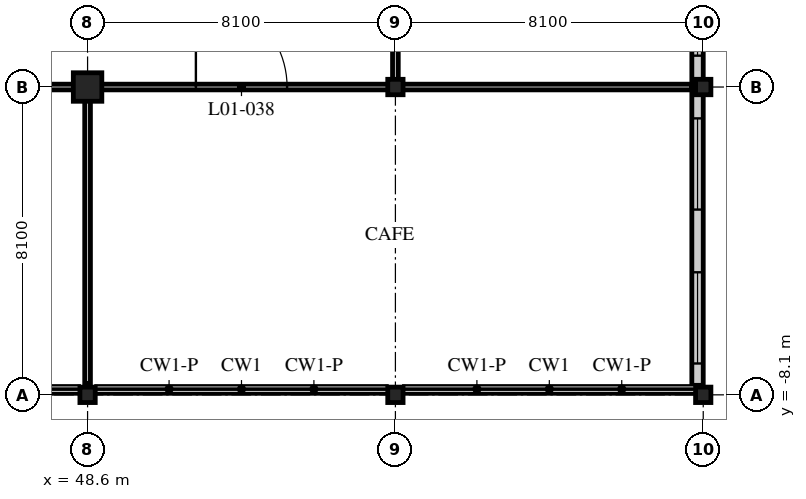
"""IFC4 building model, lengths in metres.
Left out: names, types, materials, properties, quantities, classifications, styles, units other than length and angle.
Written with IfcOpenShell. Run it as: python <this file> out.ifc"""

import sys

from ifc_helpers import new_model, si_unit, direction, frame, frame_2d, origin, origin_with_axes, origin_2d, place, context, subcontext, project, spatial, rectangle, hollow_rectangle, i_section, extrude, element, fill, save


model = new_model("IFC4")
c1 = context("Model", 3, precision=1e-05, world=origin(), true_north=direction((0.0, 1.0)))
c2 = subcontext(c1, "Body", "Model", "MODEL_VIEW")
j1 = project(units=[si_unit("LENGTHUNIT", "METRE"), si_unit("PLANEANGLEUNIT", "RADIAN")], contexts=[c1])
p1 = place(None, origin())
s1 = spatial("IfcSite", under=j1, at=p1, CompositionType="ELEMENT")
p2 = place(p1, origin())
s2 = spatial("IfcBuilding", under=s1, at=p2, CompositionType="ELEMENT")
p3 = place(p2, frame((0.0, 0.0, 6.0)))
s3 = spatial("IfcBuildingStorey", under=s2, at=p3, CompositionType="ELEMENT", Elevation=6.0)
p4 = place(p3, frame((48.6, -8.1, 0.0), z_axis=(0.0, 0.0, 1.0), x_axis=(1.0, 0.0, 0.0)))
e1 = element("IfcColumn", 1, at=p4, inside=s3, PredefinedType="COLUMN", context=c2, shape_type="SweptSolid", body=[
    extrude(i_section(OverallWidth=0.403, OverallDepth=0.406, WebThickness=0.027, FlangeThickness=0.043, FilletRadius=0.015, at=origin_2d()), origin(), (0.0, 0.0, 1.0), 5.4),
])
p5 = place(p3, frame((48.6, 0.0, 0.0), z_axis=(0.0, 0.0, 1.0), x_axis=(1.0, 0.0, 0.0)))
e2 = element("IfcColumn", 2, at=p5, inside=s3, PredefinedType="COLUMN", context=c2, shape_type="SweptSolid", body=[
    extrude(hollow_rectangle(XDim=0.75, YDim=0.75, WallThickness=0.07, at=origin_2d()), origin(), (0.0, 0.0, 1.0), 5.4),
])
for number, where, z_axis, x_axis in (
    (3, (56.7, -8.1, 0.0), (0.0, 0.0, 1.0), (1.0, 0.0, 0.0)),
    (4, (56.7, 0.0, 0.0), (0.0, 0.0, 1.0), (1.0, 0.0, 0.0)),
    (5, (64.8, -8.1, 0.0), (0.0, 0.0, 1.0), (1.0, 0.0, 0.0)),
    (6, (64.8, 0.0, 0.0), (0.0, 0.0, 1.0), (1.0, 0.0, 0.0)),
):
    element("IfcColumn", number, at=place(p3, frame(where, z_axis=z_axis, x_axis=x_axis)), inside=s3, PredefinedType="COLUMN", context=c2, shape_type="SweptSolid", body=[
        extrude(i_section(OverallWidth=0.403, OverallDepth=0.406, WebThickness=0.027, FlangeThickness=0.043, FilletRadius=0.015, at=origin_2d()), origin(), (0.0, 0.0, 1.0), 5.4),
    ])
p6 = place(p3, frame((64.65, -7.85, 0.0), z_axis=(0.0, 0.0, 1.0), x_axis=(0.0, 1.0, 0.0)))
e7 = element("IfcWall", 7, at=p6, inside=s3, PredefinedType="SOLIDWALL", context=c2, shape_type="SweptSolid", body=[
    extrude(rectangle(XDim=56.45, YDim=0.3, at=frame_2d((28.225, 0.0))), origin(), (0.0, 0.0, 1.0), 5.15),
])
p7 = place(p6, frame((0.575, 0.0, 1.0)))
e8 = element("IfcOpeningElement", 8, at=p7, cuts=e7, PredefinedType="OPENING", context=c2, shape_type="SweptSolid", body=[
    extrude(rectangle(XDim=2.4, YDim=2.75, at=frame_2d((1.2, 1.375))), frame((0.0, 0.16, 0.0), z_axis=(0.0, -1.0, 0.0), x_axis=(1.0, 0.0, 0.0)), (0.0, 0.0, 1.0), 0.32),
])
p8 = place(p6, frame((4.625, 0.0, 1.0)))
e9 = element("IfcOpeningElement", 9, at=p8, cuts=e7, PredefinedType="OPENING", context=c2, shape_type="SweptSolid", body=[
    extrude(rectangle(XDim=2.4, YDim=2.75, at=frame_2d((1.2, 1.375))), frame((0.0, 0.16, 0.0), z_axis=(0.0, -1.0, 0.0), x_axis=(1.0, 0.0, 0.0)), (0.0, 0.0, 1.0), 0.32),
])
p9 = place(p6, frame((8.675, 0.0, 1.0)))
e10 = element("IfcOpeningElement", 10, at=p9, cuts=e7, PredefinedType="OPENING", context=c2, shape_type="SweptSolid", body=[
    extrude(rectangle(XDim=2.4, YDim=2.75, at=frame_2d((1.2, 1.375))), frame((0.0, 0.16, 0.0), z_axis=(0.0, -1.0, 0.0), x_axis=(1.0, 0.0, 0.0)), (0.0, 0.0, 1.0), 0.32),
])
p10 = place(p6, frame((12.725, 0.0, 1.0)))
e11 = element("IfcOpeningElement", 11, at=p10, cuts=e7, PredefinedType="OPENING", context=c2, shape_type="SweptSolid", body=[
    extrude(rectangle(XDim=2.4, YDim=2.75, at=frame_2d((1.2, 1.375))), frame((0.0, 0.16, 0.0), z_axis=(0.0, -1.0, 0.0), x_axis=(1.0, 0.0, 0.0)), (0.0, 0.0, 1.0), 0.32),
])
p11 = place(p6, frame((16.775, 0.0, 1.0)))
e12 = element("IfcOpeningElement", 12, at=p11, cuts=e7, PredefinedType="OPENING", context=c2, shape_type="SweptSolid", body=[
    extrude(rectangle(XDim=2.4, YDim=2.75, at=frame_2d((1.2, 1.375))), frame((0.0, 0.16, 0.0), z_axis=(0.0, -1.0, 0.0), x_axis=(1.0, 0.0, 0.0)), (0.0, 0.0, 1.0), 0.32),
])
p12 = place(p6, frame((20.825, 0.0, 1.0)))
e13 = element("IfcOpeningElement", 13, at=p12, cuts=e7, PredefinedType="OPENING", context=c2, shape_type="SweptSolid", body=[
    extrude(rectangle(XDim=2.4, YDim=2.75, at=frame_2d((1.2, 1.375))), frame((0.0, 0.16, 0.0), z_axis=(0.0, -1.0, 0.0), x_axis=(1.0, 0.0, 0.0)), (0.0, 0.0, 1.0), 0.32),
])
p13 = place(p6, frame((24.875, 0.0, 1.0)))
e14 = element("IfcOpeningElement", 14, at=p13, cuts=e7, PredefinedType="OPENING", context=c2, shape_type="SweptSolid", body=[
    extrude(rectangle(XDim=2.4, YDim=2.75, at=frame_2d((1.2, 1.375))), frame((0.0, 0.16, 0.0), z_axis=(0.0, -1.0, 0.0), x_axis=(1.0, 0.0, 0.0)), (0.0, 0.0, 1.0), 0.32),
])
p14 = place(p6, frame((28.925, 0.0, 1.0)))
e15 = element("IfcOpeningElement", 15, at=p14, cuts=e7, PredefinedType="OPENING", context=c2, shape_type="SweptSolid", body=[
    extrude(rectangle(XDim=2.4, YDim=2.75, at=frame_2d((1.2, 1.375))), frame((0.0, 0.16, 0.0), z_axis=(0.0, -1.0, 0.0), x_axis=(1.0, 0.0, 0.0)), (0.0, 0.0, 1.0), 0.32),
])
p15 = place(p6, frame((32.975, 0.0, 1.0)))
e16 = element("IfcOpeningElement", 16, at=p15, cuts=e7, PredefinedType="OPENING", context=c2, shape_type="SweptSolid", body=[
    extrude(rectangle(XDim=2.4, YDim=2.75, at=frame_2d((1.2, 1.375))), frame((0.0, 0.16, 0.0), z_axis=(0.0, -1.0, 0.0), x_axis=(1.0, 0.0, 0.0)), (0.0, 0.0, 1.0), 0.32),
])
p16 = place(p6, frame((37.025, 0.0, 1.0)))
e17 = element("IfcOpeningElement", 17, at=p16, cuts=e7, PredefinedType="OPENING", context=c2, shape_type="SweptSolid", body=[
    extrude(rectangle(XDim=2.4, YDim=2.75, at=frame_2d((1.2, 1.375))), frame((0.0, 0.16, 0.0), z_axis=(0.0, -1.0, 0.0), x_axis=(1.0, 0.0, 0.0)), (0.0, 0.0, 1.0), 0.32),
])
p17 = place(p6, frame((41.075, 0.0, 1.0)))
e18 = element("IfcOpeningElement", 18, at=p17, cuts=e7, PredefinedType="OPENING", context=c2, shape_type="SweptSolid", body=[
    extrude(rectangle(XDim=2.4, YDim=2.75, at=frame_2d((1.2, 1.375))), frame((0.0, 0.16, 0.0), z_axis=(0.0, -1.0, 0.0), x_axis=(1.0, 0.0, 0.0)), (0.0, 0.0, 1.0), 0.32),
])
p18 = place(p6, frame((45.125, 0.0, 1.0)))
e19 = element("IfcOpeningElement", 19, at=p18, cuts=e7, PredefinedType="OPENING", context=c2, shape_type="SweptSolid", body=[
    extrude(rectangle(XDim=2.4, YDim=2.75, at=frame_2d((1.2, 1.375))), frame((0.0, 0.16, 0.0), z_axis=(0.0, -1.0, 0.0), x_axis=(1.0, 0.0, 0.0)), (0.0, 0.0, 1.0), 0.32),
])
p19 = place(p6, frame((49.175, 0.0, 1.0)))
e20 = element("IfcOpeningElement", 20, at=p19, cuts=e7, PredefinedType="OPENING", context=c2, shape_type="SweptSolid", body=[
    extrude(rectangle(XDim=2.4, YDim=2.75, at=frame_2d((1.2, 1.375))), frame((0.0, 0.16, 0.0), z_axis=(0.0, -1.0, 0.0), x_axis=(1.0, 0.0, 0.0)), (0.0, 0.0, 1.0), 0.32),
])
p20 = place(p6, frame((53.225, 0.0, 1.0)))
e21 = element("IfcOpeningElement", 21, at=p20, cuts=e7, PredefinedType="OPENING", context=c2, shape_type="SweptSolid", body=[
    extrude(rectangle(XDim=2.4, YDim=2.75, at=frame_2d((1.2, 1.375))), frame((0.0, 0.16, 0.0), z_axis=(0.0, -1.0, 0.0), x_axis=(1.0, 0.0, 0.0)), (0.0, 0.0, 1.0), 0.32),
])
p21 = place(p3, origin_with_axes())
e22 = element("IfcWall", 22, at=p21, inside=s3, PredefinedType="PARTITIONING", context=c2, shape_type="SweptSolid", body=[
    extrude(rectangle(XDim=56.7, YDim=0.15, at=frame_2d((28.35, 0.0))), origin(), (0.0, 0.0, 1.0), 4.538),
])
p22 = place(p21, frame((10.95, 0.0, 0.0)))
e23 = element("IfcOpeningElement", 23, at=p22, cuts=e22, PredefinedType="OPENING", context=c2, shape_type="SweptSolid", body=[
    extrude(rectangle(XDim=2.4, YDim=2.7, at=frame_2d((1.2, 1.35))), frame((0.0, 0.085, 0.0), z_axis=(0.0, -1.0, 0.0), x_axis=(1.0, 0.0, 0.0)), (0.0, 0.0, 1.0), 0.17),
])
p23 = place(p21, frame((19.05, 0.0, 0.0)))
e24 = element("IfcOpeningElement", 24, at=p23, cuts=e22, PredefinedType="OPENING", context=c2, shape_type="SweptSolid", body=[
    extrude(rectangle(XDim=2.4, YDim=2.7, at=frame_2d((1.2, 1.35))), frame((0.0, 0.085, 0.0), z_axis=(0.0, -1.0, 0.0), x_axis=(1.0, 0.0, 0.0)), (0.0, 0.0, 1.0), 0.17),
])
p24 = place(p21, frame((27.15, 0.0, 0.0)))
e25 = element("IfcOpeningElement", 25, at=p24, cuts=e22, PredefinedType="OPENING", context=c2, shape_type="SweptSolid", body=[
    extrude(rectangle(XDim=2.4, YDim=2.7, at=frame_2d((1.2, 1.35))), frame((0.0, 0.085, 0.0), z_axis=(0.0, -1.0, 0.0), x_axis=(1.0, 0.0, 0.0)), (0.0, 0.0, 1.0), 0.17),
])
p25 = place(p21, frame((35.25, 0.0, 0.0)))
e26 = element("IfcOpeningElement", 26, at=p25, cuts=e22, PredefinedType="OPENING", context=c2, shape_type="SweptSolid", body=[
    extrude(rectangle(XDim=2.4, YDim=2.7, at=frame_2d((1.2, 1.35))), frame((0.0, 0.085, 0.0), z_axis=(0.0, -1.0, 0.0), x_axis=(1.0, 0.0, 0.0)), (0.0, 0.0, 1.0), 0.17),
])
p26 = place(p21, frame((43.35, 0.0, 0.0)))
e27 = element("IfcOpeningElement", 27, at=p26, cuts=e22, PredefinedType="OPENING", context=c2, shape_type="SweptSolid", body=[
    extrude(rectangle(XDim=2.4, YDim=2.7, at=frame_2d((1.2, 1.35))), frame((0.0, 0.085, 0.0), z_axis=(0.0, -1.0, 0.0), x_axis=(1.0, 0.0, 0.0)), (0.0, 0.0, 1.0), 0.17),
])
p27 = place(p21, frame((2.85, 0.0, 0.0)))
e28 = element("IfcOpeningElement", 28, at=p27, cuts=e22, PredefinedType="OPENING", context=c2, shape_type="SweptSolid", body=[
    extrude(rectangle(XDim=2.4, YDim=2.7, at=frame_2d((1.2, 1.35))), frame((0.0, 0.085, 0.0), z_axis=(0.0, -1.0, 0.0), x_axis=(1.0, 0.0, 0.0)), (0.0, 0.0, 1.0), 0.17),
])
p28 = place(p21, frame((51.45, 0.0, 0.0)))
e29 = element("IfcOpeningElement", 29, at=p28, cuts=e22, PredefinedType="OPENING", context=c2, shape_type="SweptSolid", body=[
    extrude(rectangle(XDim=2.4, YDim=2.7, at=frame_2d((1.2, 1.35))), frame((0.0, 0.085, 0.0), z_axis=(0.0, -1.0, 0.0), x_axis=(1.0, 0.0, 0.0)), (0.0, 0.0, 1.0), 0.17),
])
p29 = place(p3, frame((56.7, 0.0, 0.0), z_axis=(0.0, 0.0, 1.0), x_axis=(0.0, 1.0, 0.0)))
e30 = element("IfcWall", 30, at=p29, inside=s3, PredefinedType="PARTITIONING", context=c2, shape_type="SweptSolid", body=[
    extrude(rectangle(XDim=44.1, YDim=0.15, at=frame_2d((22.05, 0.0))), origin(), (0.0, 0.0, 1.0), 4.538),
])
p30 = place(p29, frame((2.85, 0.0, 0.0)))
e31 = element("IfcOpeningElement", 31, at=p30, cuts=e30, PredefinedType="OPENING", context=c2, shape_type="SweptSolid", body=[
    extrude(rectangle(XDim=2.4, YDim=2.7, at=frame_2d((1.2, 1.35))), frame((0.0, 0.085, 0.0), z_axis=(0.0, -1.0, 0.0), x_axis=(1.0, 0.0, 0.0)), (0.0, 0.0, 1.0), 0.17),
])
p31 = place(p29, frame((10.95, 0.0, 0.0)))
e32 = element("IfcOpeningElement", 32, at=p31, cuts=e30, PredefinedType="OPENING", context=c2, shape_type="SweptSolid", body=[
    extrude(rectangle(XDim=2.4, YDim=2.7, at=frame_2d((1.2, 1.35))), frame((0.0, 0.085, 0.0), z_axis=(0.0, -1.0, 0.0), x_axis=(1.0, 0.0, 0.0)), (0.0, 0.0, 1.0), 0.17),
])
p32 = place(p29, frame((19.05, 0.0, 0.0)))
e33 = element("IfcOpeningElement", 33, at=p32, cuts=e30, PredefinedType="OPENING", context=c2, shape_type="SweptSolid", body=[
    extrude(rectangle(XDim=2.4, YDim=2.7, at=frame_2d((1.2, 1.35))), frame((0.0, 0.085, 0.0), z_axis=(0.0, -1.0, 0.0), x_axis=(1.0, 0.0, 0.0)), (0.0, 0.0, 1.0), 0.17),
])
p33 = place(p29, frame((27.15, 0.0, 0.0)))
e34 = element("IfcOpeningElement", 34, at=p33, cuts=e30, PredefinedType="OPENING", context=c2, shape_type="SweptSolid", body=[
    extrude(rectangle(XDim=2.4, YDim=2.7, at=frame_2d((1.2, 1.35))), frame((0.0, 0.085, 0.0), z_axis=(0.0, -1.0, 0.0), x_axis=(1.0, 0.0, 0.0)), (0.0, 0.0, 1.0), 0.17),
])
p34 = place(p29, frame((35.25, 0.0, 0.0)))
e35 = element("IfcOpeningElement", 35, at=p34, cuts=e30, PredefinedType="OPENING", context=c2, shape_type="SweptSolid", body=[
    extrude(rectangle(XDim=2.4, YDim=2.7, at=frame_2d((1.2, 1.35))), frame((0.0, 0.085, 0.0), z_axis=(0.0, -1.0, 0.0), x_axis=(1.0, 0.0, 0.0)), (0.0, 0.0, 1.0), 0.17),
])
p35 = place(p29, frame((41.325, 0.0, 0.0)))
e36 = element("IfcOpeningElement", 36, at=p35, cuts=e30, PredefinedType="OPENING", context=c2, shape_type="SweptSolid", body=[
    extrude(rectangle(XDim=2.4, YDim=2.7, at=frame_2d((1.2, 1.35))), frame((0.0, 0.085, 0.0), z_axis=(0.0, -1.0, 0.0), x_axis=(1.0, 0.0, 0.0)), (0.0, 0.0, 1.0), 0.17),
])
for number, where, z_axis, x_axis in (
    (37, (56.7, 0.0, 0.0), (0.0, 0.0, 1.0), (1.0, 0.0, 0.0)),
    (38, (48.6, 0.0, 0.0), (0.0, 0.0, 1.0), (0.0, -1.0, 0.0)),
):
    element("IfcWall", number, at=place(p3, frame(where, z_axis=z_axis, x_axis=x_axis)), inside=s3, PredefinedType="PARTITIONING", context=c2, shape_type="SweptSolid", body=[
        extrude(rectangle(XDim=7.8, YDim=0.15, at=frame_2d((3.9, 0.0))), origin(), (0.0, 0.0, 1.0), 4.538),
    ])
p36 = place(p7, origin())
e39 = element("IfcWindow", 39, at=p36, inside=s3, PartitioningType="SINGLE_PANEL", PredefinedType="WINDOW", context=c2, shape_type="SweptSolid", body=[
    extrude(rectangle(XDim=2.4, YDim=2.75, at=frame_2d((1.2, 1.375))), frame((0.0, 0.03, 0.0), z_axis=(0.0, -1.0, 0.0), x_axis=(1.0, 0.0, 0.0)), (0.0, 0.0, 1.0), 0.06),
])
fill(e8, e39)
p37 = place(p8, origin())
e40 = element("IfcWindow", 40, at=p37, inside=s3, PartitioningType="SINGLE_PANEL", PredefinedType="WINDOW", context=c2, shape_type="SweptSolid", body=[
    extrude(rectangle(XDim=2.4, YDim=2.75, at=frame_2d((1.2, 1.375))), frame((0.0, 0.03, 0.0), z_axis=(0.0, -1.0, 0.0), x_axis=(1.0, 0.0, 0.0)), (0.0, 0.0, 1.0), 0.06),
])
fill(e9, e40)
p38 = place(p9, origin())
e41 = element("IfcWindow", 41, at=p38, inside=s3, PartitioningType="SINGLE_PANEL", PredefinedType="WINDOW", context=c2, shape_type="SweptSolid", body=[
    extrude(rectangle(XDim=2.4, YDim=2.75, at=frame_2d((1.2, 1.375))), frame((0.0, 0.03, 0.0), z_axis=(0.0, -1.0, 0.0), x_axis=(1.0, 0.0, 0.0)), (0.0, 0.0, 1.0), 0.06),
])
fill(e10, e41)
p39 = place(p28, origin())
e42 = element("IfcDoor", 42, at=p39, inside=s3, OperationType="DOUBLE_DOOR_SINGLE_SWING", PredefinedType="DOOR", context=c2, shape_type="SweptSolid", body=[
    extrude(rectangle(XDim=2.4, YDim=2.7, at=frame_2d((1.2, 1.35))), frame((0.0, 0.025, 0.0), z_axis=(0.0, -1.0, 0.0), x_axis=(1.0, 0.0, 0.0)), (0.0, 0.0, 1.0), 0.05),
])
fill(e29, e42)
save(model, sys.argv[1])
